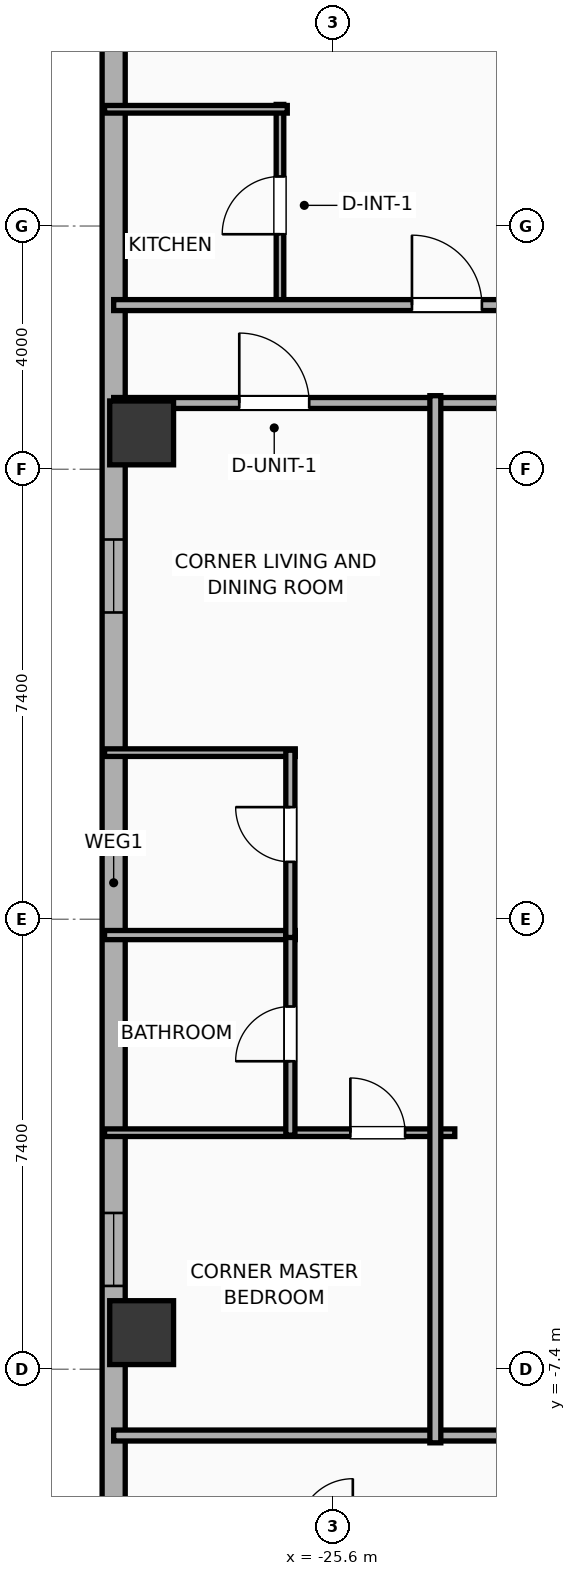
"""IFC4 building model, lengths in metres.
Left out: names, types, materials, properties, quantities, classifications, styles, units other than length and angle.
Written with IfcOpenShell. Run it as: python <this file> out.ifc"""

import sys

from ifc_helpers import new_model, si_unit, direction, frame, frame_2d, origin, origin_2d, place, context, subcontext, project, spatial, rectangle, hollow_rectangle, extrude, element, fill, save


model = new_model("IFC4")
c1 = context("Model", 3, precision=1e-05, world=origin(), true_north=direction((0.0, 1.0)))
c2 = subcontext(c1, "Body", "Model", "MODEL_VIEW")
j1 = project(units=[si_unit("LENGTHUNIT", "METRE"), si_unit("PLANEANGLEUNIT", "RADIAN")], contexts=[c1])
p1 = place(None, origin())
s1 = spatial("IfcSite", under=j1, at=p1, CompositionType="ELEMENT")
p2 = place(p1, origin())
s2 = spatial("IfcBuilding", under=s1, at=p2, CompositionType="ELEMENT")
p3 = place(p2, frame((0.0, 0.0, 101.4)))
s3 = spatial("IfcBuildingStorey", under=s2, at=p3, CompositionType="ELEMENT", Elevation=101.4)
for number, where, z_axis, x_axis in (
    (1, (-28.75, 7.998, 0.0), (0.0, 0.0, 1.0), (1.0, 0.0, 0.0)),
    (2, (-28.75, -6.798, 0.0), (0.0, 0.0, 1.0), (1.0, 0.0, 0.0)),
):
    element("IfcColumn", number, at=place(p3, frame(where, z_axis=z_axis, x_axis=x_axis)), inside=s3, PredefinedType="COLUMN", context=c2, shape_type="SweptSolid", body=[
        extrude(hollow_rectangle(XDim=1.05, YDim=1.05, WallThickness=0.036, at=origin_2d()), origin(), (0.0, 0.0, 1.0), 3.9),
    ])
p4 = place(p3, frame((-29.21, -16.581, 0.0), z_axis=(0.0, 0.0, 1.0), x_axis=(0.0, 1.0, 0.0)))
e3 = element("IfcWall", 3, at=p4, inside=s3, PredefinedType="ELEMENTEDWALL", context=c2, shape_type="SweptSolid", body=[
    extrude(rectangle(XDim=34.363, YDim=0.38, at=frame_2d((17.181, 0.0))), origin(), (0.0, 0.0, 1.0), 3.65),
])
p5 = place(p4, frame((31.087, 0.0, 0.75)))
e4 = element("IfcOpeningElement", 4, at=p5, cuts=e3, PredefinedType="OPENING", context=c2, shape_type="SweptSolid", body=[
    extrude(rectangle(XDim=1.2, YDim=2.05, at=frame_2d((0.6, 1.025))), frame((0.0, 0.2, 0.0), z_axis=(0.0, -1.0, 0.0), x_axis=(1.0, 0.0, 0.0)), (0.0, 0.0, 1.0), 0.4),
])
p6 = place(p4, frame((21.626, 0.0, 0.75)))
e5 = element("IfcOpeningElement", 5, at=p6, cuts=e3, PredefinedType="OPENING", context=c2, shape_type="SweptSolid", body=[
    extrude(rectangle(XDim=1.2, YDim=2.05, at=frame_2d((0.6, 1.025))), frame((0.0, 0.2, 0.0), z_axis=(0.0, -1.0, 0.0), x_axis=(1.0, 0.0, 0.0)), (0.0, 0.0, 1.0), 0.4),
])
p7 = place(p4, frame((10.551, 0.0, 0.75)))
e6 = element("IfcOpeningElement", 6, at=p7, cuts=e3, PredefinedType="OPENING", context=c2, shape_type="SweptSolid", body=[
    extrude(rectangle(XDim=1.2, YDim=2.05, at=frame_2d((0.6, 1.025))), frame((0.0, 0.2, 0.0), z_axis=(0.0, -1.0, 0.0), x_axis=(1.0, 0.0, 0.0)), (0.0, 0.0, 1.0), 0.4),
])
p8 = place(p3, frame((-29.21, 8.49, 0.0), z_axis=(0.0, 0.0, 1.0), x_axis=(1.0, 0.0, 0.0)))
e7 = element("IfcWall", 7, at=p8, inside=s3, PredefinedType="PARTITIONING", context=c2, shape_type="SweptSolid", body=[
    extrude(rectangle(XDim=19.33, YDim=0.18, at=frame_2d((9.665, 0.0))), origin(), (0.0, 0.0, 1.0), 3.65),
])
p9 = place(p8, frame((2.065, 0.0, 0.0)))
e8 = element("IfcOpeningElement", 8, at=p9, cuts=e7, PredefinedType="OPENING", context=c2, shape_type="SweptSolid", body=[
    extrude(rectangle(XDim=1.15, YDim=2.05, at=frame_2d((0.575, 1.025))), frame((0.0, 0.1, 0.0), z_axis=(0.0, -1.0, 0.0), x_axis=(1.0, 0.0, 0.0)), (0.0, 0.0, 1.0), 0.2),
])
p10 = place(p3, frame((-29.21, -8.49, 0.0), z_axis=(0.0, 0.0, 1.0), x_axis=(1.0, 0.0, 0.0)))
e9 = element("IfcWall", 9, at=p10, inside=s3, PredefinedType="PARTITIONING", context=c2, shape_type="SweptSolid", body=[
    extrude(rectangle(XDim=19.33, YDim=0.18, at=frame_2d((9.665, 0.0))), origin(), (0.0, 0.0, 1.0), 3.65),
])
p11 = place(p3, frame((-26.475, 10.08, 0.0), z_axis=(0.0, 0.0, 1.0), x_axis=(0.0, 1.0, 0.0)))
e10 = element("IfcWall", 10, at=p11, inside=s3, PredefinedType="PARTITIONING", context=c2, shape_type="SweptSolid", body=[
    extrude(rectangle(XDim=3.32, YDim=0.125, at=frame_2d((1.66, 0.0))), origin(), (0.0, 0.0, 1.0), 3.65),
])
p12 = place(p11, frame((1.185, 0.0, 0.0)))
e11 = element("IfcOpeningElement", 11, at=p12, cuts=e10, PredefinedType="OPENING", context=c2, shape_type="SweptSolid", body=[
    extrude(rectangle(XDim=0.95, YDim=2.05, at=frame_2d((0.475, 1.025))), frame((0.0, 0.073, 0.0), z_axis=(0.0, -1.0, 0.0), x_axis=(1.0, 0.0, 0.0)), (0.0, 0.0, 1.0), 0.145),
])
p13 = place(p3, frame((-29.36, 13.32, 0.0), z_axis=(0.0, 0.0, 1.0), x_axis=(1.0, 0.0, 0.0)))
e12 = element("IfcWall", 12, at=p13, inside=s3, PredefinedType="PARTITIONING", context=c2, shape_type="SweptSolid", body=[
    extrude(rectangle(XDim=3.005, YDim=0.125, at=frame_2d((1.502, 0.0))), origin(), (0.0, 0.0, 1.0), 3.65),
])
p14 = place(p3, frame((-29.21, 10.1, 0.0), z_axis=(0.0, 0.0, 1.0), x_axis=(1.0, 0.0, 0.0)))
e13 = element("IfcWall", 13, at=p14, inside=s3, PredefinedType="PARTITIONING", context=c2, shape_type="SweptSolid", body=[
    extrude(rectangle(XDim=62.42, YDim=0.18, at=frame_2d((31.21, 0.0))), origin(), (0.0, 0.0, 1.0), 3.65),
])
p15 = place(p14, frame((4.906, 0.0, 0.0)))
e14 = element("IfcOpeningElement", 14, at=p15, cuts=e13, PredefinedType="OPENING", context=c2, shape_type="SweptSolid", body=[
    extrude(rectangle(XDim=1.15, YDim=2.05, at=frame_2d((0.575, 1.025))), frame((0.0, 0.1, 0.0), z_axis=(0.0, -1.0, 0.0), x_axis=(1.0, 0.0, 0.0)), (0.0, 0.0, 1.0), 0.2),
])
p16 = place(p14, frame((14.812, 0.0, 0.0)))
e15 = element("IfcOpeningElement", 15, at=p16, cuts=e13, PredefinedType="OPENING", context=c2, shape_type="SweptSolid", body=[
    extrude(rectangle(XDim=1.15, YDim=2.05, at=frame_2d((0.575, 1.025))), frame((0.0, 0.1, 0.0), z_axis=(0.0, -1.0, 0.0), x_axis=(1.0, 0.0, 0.0)), (0.0, 0.0, 1.0), 0.2),
])
p17 = place(p14, frame((24.406, 0.0, 0.0)))
e16 = element("IfcOpeningElement", 16, at=p17, cuts=e13, PredefinedType="OPENING", context=c2, shape_type="SweptSolid", body=[
    extrude(rectangle(XDim=1.15, YDim=2.05, at=frame_2d((0.575, 1.025))), frame((0.0, 0.1, 0.0), z_axis=(0.0, -1.0, 0.0), x_axis=(1.0, 0.0, 0.0)), (0.0, 0.0, 1.0), 0.2),
])
p18 = place(p14, frame((33.981, 0.0, 0.0)))
e17 = element("IfcOpeningElement", 17, at=p18, cuts=e13, PredefinedType="OPENING", context=c2, shape_type="SweptSolid", body=[
    extrude(rectangle(XDim=1.15, YDim=2.05, at=frame_2d((0.575, 1.025))), frame((0.0, 0.1, 0.0), z_axis=(0.0, -1.0, 0.0), x_axis=(1.0, 0.0, 0.0)), (0.0, 0.0, 1.0), 0.2),
])
p19 = place(p14, frame((43.138, 0.0, 0.0)))
e18 = element("IfcOpeningElement", 18, at=p19, cuts=e13, PredefinedType="OPENING", context=c2, shape_type="SweptSolid", body=[
    extrude(rectangle(XDim=1.15, YDim=2.05, at=frame_2d((0.575, 1.025))), frame((0.0, 0.1, 0.0), z_axis=(0.0, -1.0, 0.0), x_axis=(1.0, 0.0, 0.0)), (0.0, 0.0, 1.0), 0.2),
])
p20 = place(p14, frame((51.777, 0.0, 0.0)))
e19 = element("IfcOpeningElement", 19, at=p20, cuts=e13, PredefinedType="OPENING", context=c2, shape_type="SweptSolid", body=[
    extrude(rectangle(XDim=0.9, YDim=2.05, at=frame_2d((0.45, 1.025))), frame((0.0, 0.1, 0.0), z_axis=(0.0, -1.0, 0.0), x_axis=(1.0, 0.0, 0.0)), (0.0, 0.0, 1.0), 0.2),
])
p21 = place(p14, frame((58.718, 0.0, 0.0)))
e20 = element("IfcOpeningElement", 20, at=p21, cuts=e13, PredefinedType="OPENING", context=c2, shape_type="SweptSolid", body=[
    extrude(rectangle(XDim=0.9, YDim=2.05, at=frame_2d((0.45, 1.025))), frame((0.0, 0.1, 0.0), z_axis=(0.0, -1.0, 0.0), x_axis=(1.0, 0.0, 0.0)), (0.0, 0.0, 1.0), 0.2),
])
p22 = place(p3, frame((-29.36, 2.74, 0.0), z_axis=(0.0, 0.0, 1.0), x_axis=(1.0, 0.0, 0.0)))
e21 = element("IfcWall", 21, at=p22, inside=s3, PredefinedType="PARTITIONING", context=c2, shape_type="SweptSolid", body=[
    extrude(rectangle(XDim=3.136, YDim=0.125, at=frame_2d((1.568, 0.0))), origin(), (0.0, 0.0, 1.0), 3.65),
])
p23 = place(p3, frame((-29.36, -0.26, 0.0), z_axis=(0.0, 0.0, 1.0), x_axis=(1.0, 0.0, 0.0)))
e22 = element("IfcWall", 22, at=p23, inside=s3, PredefinedType="PLUMBINGWALL", context=c2, shape_type="SweptSolid", body=[
    extrude(rectangle(XDim=3.136, YDim=0.15, at=frame_2d((1.568, 0.0))), origin(), (0.0, 0.0, 1.0), 3.65),
])
p24 = place(p3, frame((-29.36, -3.51, 0.0), z_axis=(0.0, 0.0, 1.0), x_axis=(1.0, 0.0, 0.0)))
e23 = element("IfcWall", 23, at=p24, inside=s3, PredefinedType="PARTITIONING", context=c2, shape_type="SweptSolid", body=[
    extrude(rectangle(XDim=5.76, YDim=0.125, at=frame_2d((2.88, 0.0))), origin(), (0.0, 0.0, 1.0), 3.65),
])
p25 = place(p24, frame((4.043, 0.0, 0.0)))
e24 = element("IfcOpeningElement", 24, at=p25, cuts=e23, PredefinedType="OPENING", context=c2, shape_type="SweptSolid", body=[
    extrude(rectangle(XDim=0.9, YDim=2.05, at=frame_2d((0.45, 1.025))), frame((0.0, 0.073, 0.0), z_axis=(0.0, -1.0, 0.0), x_axis=(1.0, 0.0, 0.0)), (0.0, 0.0, 1.0), 0.145),
])
p26 = place(p3, frame((-26.304, -3.55, 0.0), z_axis=(0.0, 0.0, 1.0), x_axis=(0.0, 1.0, 0.0)))
e25 = element("IfcWall", 25, at=p26, inside=s3, PredefinedType="PLUMBINGWALL", context=c2, shape_type="SweptSolid", body=[
    extrude(rectangle(XDim=3.33, YDim=0.15, at=frame_2d((1.665, 0.0))), origin(), (0.0, 0.0, 1.0), 3.65),
])
p27 = place(p26, frame((1.215, 0.0, 0.0)))
e26 = element("IfcOpeningElement", 26, at=p27, cuts=e25, PredefinedType="OPENING", context=c2, shape_type="SweptSolid", body=[
    extrude(rectangle(XDim=0.9, YDim=2.05, at=frame_2d((0.45, 1.025))), frame((0.0, 0.085, 0.0), z_axis=(0.0, -1.0, 0.0), x_axis=(1.0, 0.0, 0.0)), (0.0, 0.0, 1.0), 0.17),
])
p28 = place(p3, frame((-26.304, -0.3, 0.0), z_axis=(0.0, 0.0, 1.0), x_axis=(0.0, 1.0, 0.0)))
e27 = element("IfcWall", 27, at=p28, inside=s3, PredefinedType="PLUMBINGWALL", context=c2, shape_type="SweptSolid", body=[
    extrude(rectangle(XDim=3.08, YDim=0.15, at=frame_2d((1.54, 0.0))), origin(), (0.0, 0.0, 1.0), 3.65),
])
p29 = place(p28, frame((1.244, 0.0, 0.0)))
e28 = element("IfcOpeningElement", 28, at=p29, cuts=e27, PredefinedType="OPENING", context=c2, shape_type="SweptSolid", body=[
    extrude(rectangle(XDim=0.9, YDim=2.05, at=frame_2d((0.45, 1.025))), frame((0.0, 0.085, 0.0), z_axis=(0.0, -1.0, 0.0), x_axis=(1.0, 0.0, 0.0)), (0.0, 0.0, 1.0), 0.17),
])
p30 = place(p3, frame((-23.92, -8.61, 0.0), z_axis=(0.0, 0.0, 1.0), x_axis=(0.0, 1.0, 0.0)))
e29 = element("IfcWall", 29, at=p30, inside=s3, PredefinedType="PARTITIONING", context=c2, shape_type="SweptSolid", body=[
    extrude(rectangle(XDim=17.22, YDim=0.18, at=frame_2d((8.61, 0.0))), origin(), (0.0, 0.0, 1.0), 3.65),
])
p31 = place(p6, origin())
e30 = element("IfcWindow", 30, at=p31, inside=s3, PartitioningType="SINGLE_PANEL", PredefinedType="WINDOW", context=c2, shape_type="SweptSolid", body=[
    extrude(rectangle(XDim=1.2, YDim=2.05, at=frame_2d((0.6, 1.025))), frame((0.0, 0.03, 0.0), z_axis=(0.0, -1.0, 0.0), x_axis=(1.0, 0.0, 0.0)), (0.0, 0.0, 1.0), 0.06),
])
fill(e5, e30)
p32 = place(p7, origin())
e31 = element("IfcWindow", 31, at=p32, inside=s3, PartitioningType="SINGLE_PANEL", PredefinedType="WINDOW", context=c2, shape_type="SweptSolid", body=[
    extrude(rectangle(XDim=1.2, YDim=2.05, at=frame_2d((0.6, 1.025))), frame((0.0, 0.03, 0.0), z_axis=(0.0, -1.0, 0.0), x_axis=(1.0, 0.0, 0.0)), (0.0, 0.0, 1.0), 0.06),
])
fill(e6, e31)
p33 = place(p9, origin())
e32 = element("IfcDoor", 32, at=p33, inside=s3, OperationType="SINGLE_SWING_LEFT", PredefinedType="DOOR", context=c2, shape_type="SweptSolid", body=[
    extrude(rectangle(XDim=1.15, YDim=2.05, at=frame_2d((0.575, 1.025))), frame((0.0, 0.025, 0.0), z_axis=(0.0, -1.0, 0.0), x_axis=(1.0, 0.0, 0.0)), (0.0, 0.0, 1.0), 0.05),
])
fill(e8, e32)
p34 = place(p12, origin())
e33 = element("IfcDoor", 33, at=p34, inside=s3, OperationType="SINGLE_SWING_LEFT", PredefinedType="DOOR", context=c2, shape_type="SweptSolid", body=[
    extrude(rectangle(XDim=0.95, YDim=2.05, at=frame_2d((0.475, 1.025))), frame((0.0, 0.025, 0.0), z_axis=(0.0, -1.0, 0.0), x_axis=(1.0, 0.0, 0.0)), (0.0, 0.0, 1.0), 0.05),
])
fill(e11, e33)
p35 = place(p15, origin())
e34 = element("IfcDoor", 34, at=p35, inside=s3, OperationType="SINGLE_SWING_LEFT", PredefinedType="DOOR", context=c2, shape_type="SweptSolid", body=[
    extrude(rectangle(XDim=1.15, YDim=2.05, at=frame_2d((0.575, 1.025))), frame((0.0, 0.025, 0.0), z_axis=(0.0, -1.0, 0.0), x_axis=(1.0, 0.0, 0.0)), (0.0, 0.0, 1.0), 0.05),
])
fill(e14, e34)
p36 = place(p25, origin())
e35 = element("IfcDoor", 35, at=p36, inside=s3, OperationType="SINGLE_SWING_LEFT", PredefinedType="DOOR", context=c2, shape_type="SweptSolid", body=[
    extrude(rectangle(XDim=0.9, YDim=2.05, at=frame_2d((0.45, 1.025))), frame((0.0, 0.025, 0.0), z_axis=(0.0, -1.0, 0.0), x_axis=(1.0, 0.0, 0.0)), (0.0, 0.0, 1.0), 0.05),
])
fill(e24, e35)
p37 = place(p27, origin())
e36 = element("IfcDoor", 36, at=p37, inside=s3, OperationType="SINGLE_SWING_LEFT", PredefinedType="DOOR", context=c2, shape_type="SweptSolid", body=[
    extrude(rectangle(XDim=0.9, YDim=2.05, at=frame_2d((0.45, 1.025))), frame((0.0, 0.025, 0.0), z_axis=(0.0, -1.0, 0.0), x_axis=(1.0, 0.0, 0.0)), (0.0, 0.0, 1.0), 0.05),
])
fill(e26, e36)
p38 = place(p29, origin())
e37 = element("IfcDoor", 37, at=p38, inside=s3, OperationType="SINGLE_SWING_RIGHT", PredefinedType="DOOR", context=c2, shape_type="SweptSolid", body=[
    extrude(rectangle(XDim=0.9, YDim=2.05, at=frame_2d((0.45, 1.025))), frame((0.0, 0.025, 0.0), z_axis=(0.0, -1.0, 0.0), x_axis=(1.0, 0.0, 0.0)), (0.0, 0.0, 1.0), 0.05),
])
fill(e28, e37)
save(model, sys.argv[1])
